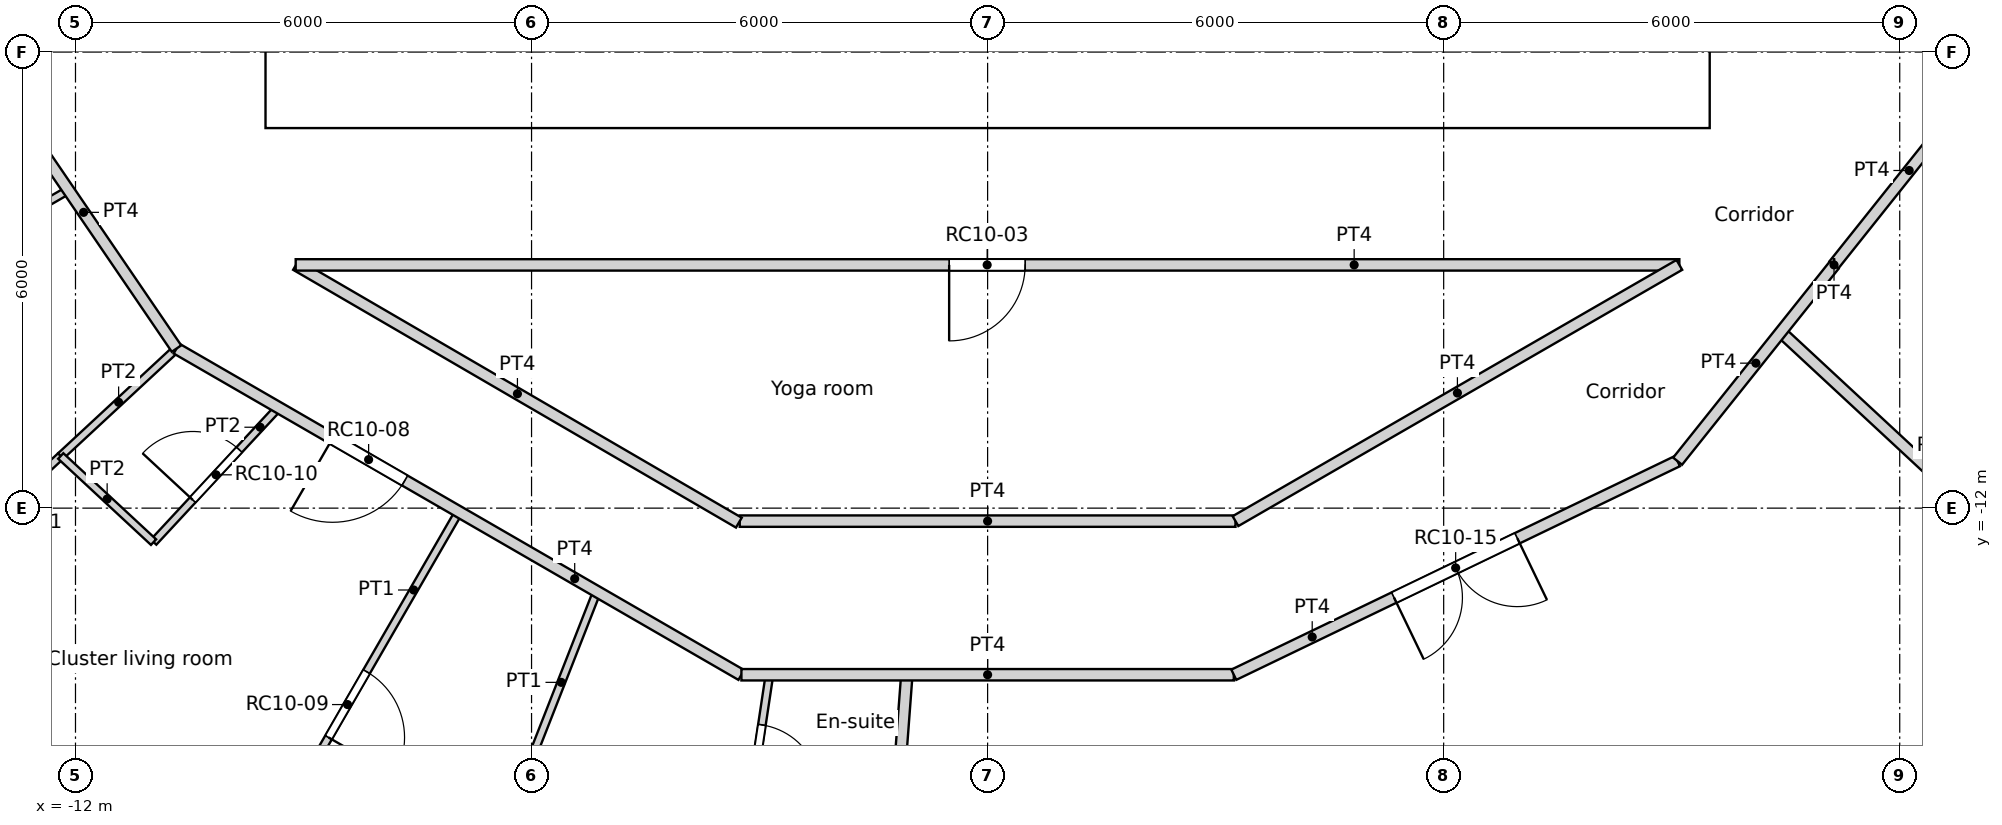
"""IFC4 building model, lengths in metres.
Left out: names, types, materials, properties, quantities, classifications, styles, units other than length and angle.
Written with IfcOpenShell. Run it as: python <this file> out.ifc"""

import sys

from ifc_helpers import new_model, si_unit, direction, frame, frame_2d, origin, origin_2d, place, context, subcontext, project, spatial, rectangle, circle, extrude, element, fill, save


model = new_model("IFC4")
c1 = context("Model", 3, precision=1e-05, world=origin(), true_north=direction((0.0, 1.0)))
c2 = subcontext(c1, "Body", "Model", "MODEL_VIEW")
j1 = project(units=[si_unit("LENGTHUNIT", "METRE"), si_unit("PLANEANGLEUNIT", "RADIAN")], contexts=[c1])
p1 = place(None, origin())
s1 = spatial("IfcSite", under=j1, at=p1, CompositionType="ELEMENT")
p2 = place(p1, origin())
s2 = spatial("IfcBuilding", under=s1, at=p2, CompositionType="ELEMENT")
p3 = place(p2, frame((0.0, 0.0, 323.4)))
s3 = spatial("IfcBuildingStorey", under=s2, at=p3, CompositionType="ELEMENT", Elevation=323.4)
p4 = place(p3, frame((11.735, -14.716, 0.0), z_axis=(0.0, 0.0, 1.0), x_axis=(1.0, 0.0, 0.0)))
e1 = element("IfcColumn", 1, at=p4, inside=s3, PredefinedType="COLUMN", context=c2, shape_type="SweptSolid", body=[
    extrude(circle(Radius=0.45, at=origin_2d()), origin(), (0.0, 0.0, 1.0), 3.6),
])
p5 = place(p3, frame((-9.5, -6.7, 0.0), z_axis=(0.0, 0.0, 1.0), x_axis=(1.0, 0.0, 0.0)))
e2 = element("IfcWall", 2, at=p5, inside=s3, PredefinedType="SOLIDWALL", context=c2, shape_type="SweptSolid", body=[
    extrude(rectangle(XDim=19.0, YDim=0.6, at=frame_2d((9.5, 0.0))), origin(), (0.0, 0.0, 1.0), 3.6),
])
p6 = place(p5, frame((10.4, 0.0, 0.0)))
e3 = element("IfcOpeningElement", 3, at=p6, cuts=e2, PredefinedType="OPENING", context=c2, shape_type="SweptSolid", body=[
    extrude(rectangle(XDim=1.0, YDim=2.1, at=frame_2d((0.5, 1.05))), frame((0.0, 0.3, 0.0), z_axis=(0.0, -1.0, 0.0), x_axis=(1.0, 0.0, 0.0)), (0.0, 0.0, 1.0), 0.6),
])
p7 = place(p5, frame((5.35, 0.0, 0.0)))
e4 = element("IfcOpeningElement", 4, at=p7, cuts=e2, PredefinedType="OPENING", context=c2, shape_type="SweptSolid", body=[
    extrude(rectangle(XDim=1.7, YDim=2.1, at=frame_2d((0.85, 1.05))), frame((0.0, 0.3, 0.0), z_axis=(0.0, -1.0, 0.0), x_axis=(1.0, 0.0, 0.0)), (0.0, 0.0, 1.0), 0.6),
])
p8 = place(p5, frame((11.95, 0.0, 0.0)))
e5 = element("IfcOpeningElement", 5, at=p8, cuts=e2, PredefinedType="OPENING", context=c2, shape_type="SweptSolid", body=[
    extrude(rectangle(XDim=1.7, YDim=2.1, at=frame_2d((0.85, 1.05))), frame((0.0, 0.3, 0.0), z_axis=(0.0, -1.0, 0.0), x_axis=(1.0, 0.0, 0.0)), (0.0, 0.0, 1.0), 0.6),
])
p9 = place(p3, frame((-9.2, -6.4, 0.0), z_axis=(0.0, 0.0, 1.0), x_axis=(0.0, 1.0, 0.0)))
e6 = element("IfcWall", 6, at=p9, inside=s3, PredefinedType="SOLIDWALL", context=c2, shape_type="SweptSolid", body=[
    extrude(rectangle(XDim=12.8, YDim=0.6, at=frame_2d((6.4, 0.0))), origin(), (0.0, 0.0, 1.0), 3.6),
])
p10 = place(p3, frame((9.2, -6.4, 0.0), z_axis=(0.0, 0.0, 1.0), x_axis=(0.0, 1.0, 0.0)))
e7 = element("IfcWall", 7, at=p10, inside=s3, PredefinedType="SOLIDWALL", context=c2, shape_type="SweptSolid", body=[
    extrude(rectangle(XDim=12.8, YDim=0.6, at=frame_2d((6.4, 0.0))), origin(), (0.0, 0.0, 1.0), 3.6),
])
p11 = place(p10, frame((6.4, 0.0, 0.0)))
e8 = element("IfcOpeningElement", 8, at=p11, cuts=e7, PredefinedType="OPENING", context=c2, shape_type="SweptSolid", body=[
    extrude(rectangle(XDim=1.8, YDim=2.1, at=frame_2d((0.9, 1.05))), frame((0.0, 0.3, 0.0), z_axis=(0.0, -1.0, 0.0), x_axis=(1.0, 0.0, 0.0)), (0.0, 0.0, 1.0), 0.6),
])
for number, where, z_axis, x_axis in (
    (9, (-2.25, -6.4, 0.0), (0.0, 0.0, 1.0), (0.0, 1.0, 0.0)),
    (10, (0.55, -6.4, 0.0), (0.0, 0.0, 1.0), (0.0, 1.0, 0.0)),
    (11, (2.25, -6.4, 0.0), (0.0, 0.0, 1.0), (0.0, 1.0, 0.0)),
):
    element("IfcWall", number, at=place(p3, frame(where, z_axis=z_axis, x_axis=x_axis)), inside=s3, PredefinedType="SOLIDWALL", context=c2, shape_type="SweptSolid", body=[
        extrude(rectangle(XDim=3.15, YDim=0.3, at=frame_2d((1.575, 0.0))), origin(), (0.0, 0.0, 1.0), 3.25),
    ])
p12 = place(p3, frame((-9.103, -8.8, 0.0), z_axis=(0.0, 0.0, 1.0), x_axis=(1.0, 0.0, 0.0)))
e12 = element("IfcWall", 12, at=p12, inside=s3, PredefinedType="PARTITIONING", context=c2, shape_type="SweptSolid", body=[
    extrude(rectangle(XDim=18.204, YDim=0.15, at=frame_2d((9.102, 0.0))), origin(), (0.0, 0.0, 1.0), 3.25),
])
p13 = place(p12, frame((8.597, 0.0, 0.0)))
e13 = element("IfcOpeningElement", 13, at=p13, cuts=e12, PredefinedType="OPENING", context=c2, shape_type="SweptSolid", body=[
    extrude(rectangle(XDim=1.0, YDim=2.04, at=frame_2d((0.5, 1.02))), frame((0.0, 0.075, 0.0), z_axis=(0.0, -1.0, 0.0), x_axis=(1.0, 0.0, 0.0)), (0.0, 0.0, 1.0), 0.15),
])
p14 = place(p3, frame((9.078, -11.382, 0.0), z_axis=(0.0, 0.0, 1.0), x_axis=(0.624018330412, 0.781409702595, 0.0)))
e14 = element("IfcWall", 14, at=p14, inside=s3, PredefinedType="PARTITIONING", context=c2, shape_type="SweptSolid", body=[
    extrude(rectangle(XDim=3.301, YDim=0.15, at=frame_2d((1.65, 0.0))), origin(), (0.0, 0.0, 1.0), 3.25),
])
p15 = place(p3, frame((11.137, -8.8, 0.0), z_axis=(0.0, 0.0, 1.0), x_axis=(-1.0, 0.0, 0.0)))
e15 = element("IfcWall", 15, at=p15, inside=s3, PredefinedType="PARTITIONING", context=c2, shape_type="SweptSolid", body=[
    extrude(rectangle(XDim=0.003, YDim=0.15, at=frame_2d((0.001, 0.0))), origin(), (0.0, 0.0, 1.0), 3.25),
])
p16 = place(p3, frame((11.134, -8.8, 0.0), z_axis=(0.0, 0.0, 1.0), x_axis=(0.623476099415, 0.781842409606, 0.0)))
e16 = element("IfcWall", 16, at=p16, inside=s3, PredefinedType="PARTITIONING", context=c2, shape_type="SweptSolid", body=[
    extrude(rectangle(XDim=3.177, YDim=0.15, at=frame_2d((1.589, 0.0))), origin(), (0.0, 0.0, 1.0), 3.25),
])
p17 = place(p3, frame((-9.099, -8.8, 0.0), z_axis=(0.0, 0.0, 1.0), x_axis=(0.864286794128, -0.502999341447, 0.0)))
e17 = element("IfcWall", 17, at=p17, inside=s3, PredefinedType="PARTITIONING", context=c2, shape_type="SweptSolid", body=[
    extrude(rectangle(XDim=6.741, YDim=0.15, at=frame_2d((3.371, 0.0))), origin(), (0.0, 0.0, 1.0), 3.25),
])
p18 = place(p3, frame((-10.671, -9.901, 0.0), z_axis=(0.0, 0.0, 1.0), x_axis=(0.865823993551, -0.500348690606, 0.0)))
e18 = element("IfcWall", 18, at=p18, inside=s3, PredefinedType="PARTITIONING", context=c2, shape_type="SweptSolid", body=[
    extrude(rectangle(XDim=8.582, YDim=0.15, at=frame_2d((4.291, 0.0))), origin(), (0.0, 0.0, 1.0), 3.25),
])
p19 = place(p18, frame((2.369, 0.0, 0.0)))
e19 = element("IfcOpeningElement", 19, at=p19, cuts=e18, PredefinedType="OPENING", context=c2, shape_type="SweptSolid", body=[
    extrude(rectangle(XDim=1.1, YDim=2.1, at=frame_2d((0.55, 1.05))), frame((0.0, 0.075, 0.0), z_axis=(0.0, -1.0, 0.0), x_axis=(1.0, 0.0, 0.0)), (0.0, 0.0, 1.0), 0.15),
])
p20 = place(p3, frame((-13.115, -6.316, 0.0), z_axis=(0.0, 0.0, 1.0), x_axis=(0.563434599286, -0.826160669802, 0.0)))
e20 = element("IfcWall", 20, at=p20, inside=s3, PredefinedType="PARTITIONING", context=c2, shape_type="SweptSolid", body=[
    extrude(rectangle(XDim=4.339, YDim=0.15, at=frame_2d((2.169, 0.0))), origin(), (0.0, 0.0, 1.0), 3.25),
])
p21 = place(p3, frame((-3.261, -12.171, 0.0), z_axis=(0.0, 0.0, 1.0), x_axis=(1.0, 0.0, 0.0)))
e21 = element("IfcWall", 21, at=p21, inside=s3, PredefinedType="PARTITIONING", context=c2, shape_type="SweptSolid", body=[
    extrude(rectangle(XDim=6.522, YDim=0.15, at=frame_2d((3.261, 0.0))), origin(), (0.0, 0.0, 1.0), 3.25),
])
p22 = place(p3, frame((3.261, -12.171, 0.0), z_axis=(0.0, 0.0, 1.0), x_axis=(0.866066809554, 0.499928276245, 0.0)))
e22 = element("IfcWall", 22, at=p22, inside=s3, PredefinedType="PARTITIONING", context=c2, shape_type="SweptSolid", body=[
    extrude(rectangle(XDim=6.743, YDim=0.15, at=frame_2d((3.371, 0.0))), origin(), (0.0, 0.0, 1.0), 3.25),
])
p23 = place(p3, frame((-3.239, -14.192, 0.0), z_axis=(0.0, 0.0, 1.0), x_axis=(1.0, 0.0, 0.0)))
e23 = element("IfcWall", 23, at=p23, inside=s3, PredefinedType="PARTITIONING", context=c2, shape_type="SweptSolid", body=[
    extrude(rectangle(XDim=6.478, YDim=0.15, at=frame_2d((3.239, 0.0))), origin(), (0.0, 0.0, 1.0), 3.25),
])
p24 = place(p3, frame((3.239, -14.192, 0.0), z_axis=(0.0, 0.0, 1.0), x_axis=(0.900976027191, 0.433868872388, 0.0)))
e24 = element("IfcWall", 24, at=p24, inside=s3, PredefinedType="PARTITIONING", context=c2, shape_type="SweptSolid", body=[
    extrude(rectangle(XDim=6.479, YDim=0.15, at=frame_2d((3.239, 0.0))), origin(), (0.0, 0.0, 1.0), 3.25),
])
p25 = place(p24, frame((2.34, 0.0, 0.0)))
e25 = element("IfcOpeningElement", 25, at=p25, cuts=e24, PredefinedType="OPENING", context=c2, shape_type="SweptSolid", body=[
    extrude(rectangle(XDim=1.8, YDim=2.1, at=frame_2d((0.9, 1.05))), frame((0.0, 0.075, 0.0), z_axis=(0.0, -1.0, 0.0), x_axis=(1.0, 0.0, 0.0)), (0.0, 0.0, 1.0), 0.15),
])
p26 = place(p3, frame((-9.886, -17.122, 0.0), z_axis=(0.0, 0.0, 1.0), x_axis=(0.500022903925, 0.866012179793, 0.0)))
e26 = element("IfcWall", 26, at=p26, inside=s3, PredefinedType="PARTITIONING", context=c2, shape_type="SweptSolid", body=[
    extrude(rectangle(XDim=5.862, YDim=0.1, at=frame_2d((2.931, 0.0))), origin(), (0.0, 0.0, 1.0), 3.25),
])
p27 = place(p26, frame((2.43, 0.0, 0.0)))
e27 = element("IfcOpeningElement", 27, at=p27, cuts=e26, PredefinedType="OPENING", context=c2, shape_type="SweptSolid", body=[
    extrude(rectangle(XDim=1.0, YDim=2.04, at=frame_2d((0.5, 1.02))), frame((0.0, 0.05, 0.0), z_axis=(0.0, -1.0, 0.0), x_axis=(1.0, 0.0, 0.0)), (0.0, 0.0, 1.0), 0.1),
])
p28 = place(p3, frame((-12.194, -11.314, 0.0), z_axis=(0.0, 0.0, 1.0), x_axis=(0.733064860014, -0.680158739569, 0.0)))
e28 = element("IfcWall", 28, at=p28, inside=s3, PredefinedType="PARTITIONING", context=c2, shape_type="SweptSolid", body=[
    extrude(rectangle(XDim=1.666, YDim=0.1, at=frame_2d((0.833, 0.0))), origin(), (0.0, 0.0, 1.0), 3.25),
])
p29 = place(p3, frame((-10.973, -12.447, 0.0), z_axis=(0.0, 0.0, 1.0), x_axis=(0.680296065293, 0.732937421303, 0.0)))
e29 = element("IfcWall", 29, at=p29, inside=s3, PredefinedType="PARTITIONING", context=c2, shape_type="SweptSolid", body=[
    extrude(rectangle(XDim=2.416, YDim=0.1, at=frame_2d((1.208, 0.0))), origin(), (0.0, 0.0, 1.0), 3.25),
])
p30 = place(p29, frame((0.758, 0.0, 0.0)))
e30 = element("IfcOpeningElement", 30, at=p30, cuts=e29, PredefinedType="OPENING", context=c2, shape_type="SweptSolid", body=[
    extrude(rectangle(XDim=0.9, YDim=2.0, at=frame_2d((0.45, 1.0))), frame((0.0, 0.05, 0.0), z_axis=(0.0, -1.0, 0.0), x_axis=(1.0, 0.0, 0.0)), (0.0, 0.0, 1.0), 0.1),
])
p31 = place(p3, frame((-14.493, -13.448, 0.0), z_axis=(0.0, 0.0, 1.0), x_axis=(0.732887738731, 0.680349588387, 0.0)))
e31 = element("IfcWall", 31, at=p31, inside=s3, PredefinedType="PARTITIONING", context=c2, shape_type="SweptSolid", body=[
    extrude(rectangle(XDim=3.137, YDim=0.1, at=frame_2d((1.568, 0.0))), origin(), (0.0, 0.0, 1.0), 3.25),
])
p32 = place(p31, frame((1.96, 0.0, 0.0)))
e32 = element("IfcOpeningElement", 32, at=p32, cuts=e31, PredefinedType="OPENING", context=c2, shape_type="SweptSolid", body=[
    extrude(rectangle(XDim=0.9, YDim=2.1, at=frame_2d((0.45, 1.05))), frame((0.0, 0.05, 0.0), z_axis=(0.0, -1.0, 0.0), x_axis=(1.0, 0.0, 0.0)), (0.0, 0.0, 1.0), 0.1),
])
p33 = place(p3, frame((-7.223, -18.405, 0.0), z_axis=(0.0, 0.0, 1.0), x_axis=(0.365331902423, 0.930877328691, 0.0)))
e33 = element("IfcWall", 33, at=p33, inside=s3, PredefinedType="PARTITIONING", context=c2, shape_type="SweptSolid", body=[
    extrude(rectangle(XDim=5.704, YDim=0.1, at=frame_2d((2.852, 0.0))), origin(), (0.0, 0.0, 1.0), 3.25),
])
p34 = place(p33, frame((2.182, 0.0, 0.0)))
e34 = element("IfcOpeningElement", 34, at=p34, cuts=e33, PredefinedType="OPENING", context=c2, shape_type="SweptSolid", body=[
    extrude(rectangle(XDim=0.9, YDim=2.1, at=frame_2d((0.45, 1.05))), frame((0.0, 0.05, 0.0), z_axis=(0.0, -1.0, 0.0), x_axis=(1.0, 0.0, 0.0)), (0.0, 0.0, 1.0), 0.1),
])
p35 = place(p3, frame((-12.194, -11.314, 0.0), z_axis=(0.0, 0.0, 1.0), x_axis=(0.733107294142, 0.680113001843, 0.0)))
e35 = element("IfcWall", 35, at=p35, inside=s3, PredefinedType="PARTITIONING", context=c2, shape_type="SweptSolid", body=[
    extrude(rectangle(XDim=2.078, YDim=0.1, at=frame_2d((1.039, 0.0))), origin(), (0.0, 0.0, 1.0), 3.25),
])
p36 = place(p3, frame((-14.242, -9.057, 0.0), z_axis=(0.0, 0.0, 1.0), x_axis=(0.865975856927, 0.500085807857, 0.0)))
e36 = element("IfcWall", 36, at=p36, inside=s3, PredefinedType="PARTITIONING", context=c2, shape_type="SweptSolid", body=[
    extrude(rectangle(XDim=2.481, YDim=0.1, at=frame_2d((1.241, 0.0))), origin(), (0.0, 0.0, 1.0), 3.25),
])
p37 = place(p36, frame((0.791, 0.0, 0.0)))
e37 = element("IfcOpeningElement", 37, at=p37, cuts=e36, PredefinedType="OPENING", context=c2, shape_type="SweptSolid", body=[
    extrude(rectangle(XDim=0.9, YDim=2.04, at=frame_2d((0.45, 1.02))), frame((0.0, 0.05, 0.0), z_axis=(0.0, -1.0, 0.0), x_axis=(1.0, 0.0, 0.0)), (0.0, 0.0, 1.0), 0.1),
])
p38 = place(p3, frame((-3.203, -16.401, 0.0), z_axis=(0.0, 0.0, 1.0), x_axis=(0.148960349288, 0.988843169739, 0.0)))
e38 = element("IfcWall", 38, at=p38, inside=s3, PredefinedType="PARTITIONING", context=c2, shape_type="SweptSolid", body=[
    extrude(rectangle(XDim=2.234, YDim=0.1, at=frame_2d((1.117, 0.0))), origin(), (0.0, 0.0, 1.0), 3.25),
])
p39 = place(p38, frame((0.667, 0.0, 0.0)))
e39 = element("IfcOpeningElement", 39, at=p39, cuts=e38, PredefinedType="OPENING", context=c2, shape_type="SweptSolid", body=[
    extrude(rectangle(XDim=0.9, YDim=2.04, at=frame_2d((0.45, 1.02))), frame((0.0, 0.05, 0.0), z_axis=(0.0, -1.0, 0.0), x_axis=(1.0, 0.0, 0.0)), (0.0, 0.0, 1.0), 0.1),
])
p40 = place(p3, frame((-1.478, -19.716, 0.0), z_axis=(0.0, 0.0, 1.0), x_axis=(0.074923617461, 0.997189275688, 0.0)))
e40 = element("IfcWall", 40, at=p40, inside=s3, PredefinedType="PARTITIONING", context=c2, shape_type="SweptSolid", body=[
    extrude(rectangle(XDim=5.54, YDim=0.15, at=frame_2d((2.77, 0.0))), origin(), (0.0, 0.0, 1.0), 3.25),
])
p41 = place(p3, frame((10.433, -9.68, 0.0), z_axis=(0.0, 0.0, 1.0), x_axis=(0.73295202722, -0.68028032883, 0.0)))
e41 = element("IfcWall", 41, at=p41, inside=s3, PredefinedType="PARTITIONING", context=c2, shape_type="SweptSolid", body=[
    extrude(rectangle(XDim=5.539, YDim=0.15, at=frame_2d((2.77, 0.0))), origin(), (0.0, 0.0, 1.0), 3.25),
])
p42 = place(p6, origin())
e42 = element("IfcDoor", 42, at=p42, inside=s3, OperationType="SINGLE_SWING_LEFT", PredefinedType="DOOR", context=c2, shape_type="SweptSolid", body=[
    extrude(rectangle(XDim=1.0, YDim=2.1, at=frame_2d((0.5, 1.05))), frame((0.0, 0.025, 0.0), z_axis=(0.0, -1.0, 0.0), x_axis=(1.0, 0.0, 0.0)), (0.0, 0.0, 1.0), 0.05),
])
fill(e3, e42)
p43 = place(p7, origin())
e43 = element("IfcDoor", 43, at=p43, inside=s3, OperationType="DOUBLE_DOOR_SINGLE_SWING", PredefinedType="DOOR", context=c2, shape_type="SweptSolid", body=[
    extrude(rectangle(XDim=1.7, YDim=2.1, at=frame_2d((0.85, 1.05))), frame((0.0, 0.025, 0.0), z_axis=(0.0, -1.0, 0.0), x_axis=(1.0, 0.0, 0.0)), (0.0, 0.0, 1.0), 0.05),
])
fill(e4, e43)
p44 = place(p8, origin())
e44 = element("IfcDoor", 44, at=p44, inside=s3, OperationType="DOUBLE_DOOR_SINGLE_SWING", PredefinedType="DOOR", context=c2, shape_type="SweptSolid", body=[
    extrude(rectangle(XDim=1.7, YDim=2.1, at=frame_2d((0.85, 1.05))), frame((0.0, 0.025, 0.0), z_axis=(0.0, -1.0, 0.0), x_axis=(1.0, 0.0, 0.0)), (0.0, 0.0, 1.0), 0.05),
])
fill(e5, e44)
p45 = place(p13, origin())
e45 = element("IfcDoor", 45, at=p45, inside=s3, OperationType="SINGLE_SWING_RIGHT", PredefinedType="DOOR", context=c2, shape_type="SweptSolid", body=[
    extrude(rectangle(XDim=1.0, YDim=2.04, at=frame_2d((0.5, 1.02))), frame((0.0, 0.025, 0.0), z_axis=(0.0, -1.0, 0.0), x_axis=(1.0, 0.0, 0.0)), (0.0, 0.0, 1.0), 0.05),
])
fill(e13, e45)
p46 = place(p19, origin())
e46 = element("IfcDoor", 46, at=p46, inside=s3, OperationType="SINGLE_SWING_RIGHT", PredefinedType="DOOR", context=c2, shape_type="SweptSolid", body=[
    extrude(rectangle(XDim=1.1, YDim=2.1, at=frame_2d((0.55, 1.05))), frame((0.0, 0.025, 0.0), z_axis=(0.0, -1.0, 0.0), x_axis=(1.0, 0.0, 0.0)), (0.0, 0.0, 1.0), 0.05),
])
fill(e19, e46)
p47 = place(p27, origin())
e47 = element("IfcDoor", 47, at=p47, inside=s3, OperationType="SINGLE_SWING_RIGHT", PredefinedType="DOOR", context=c2, shape_type="SweptSolid", body=[
    extrude(rectangle(XDim=1.0, YDim=2.04, at=frame_2d((0.5, 1.02))), frame((0.0, 0.025, 0.0), z_axis=(0.0, -1.0, 0.0), x_axis=(1.0, 0.0, 0.0)), (0.0, 0.0, 1.0), 0.05),
])
fill(e27, e47)
p48 = place(p30, origin())
e48 = element("IfcDoor", 48, at=p48, inside=s3, OperationType="SINGLE_SWING_LEFT", PredefinedType="DOOR", context=c2, shape_type="SweptSolid", body=[
    extrude(rectangle(XDim=0.9, YDim=2.0, at=frame_2d((0.45, 1.0))), frame((0.0, 0.025, 0.0), z_axis=(0.0, -1.0, 0.0), x_axis=(1.0, 0.0, 0.0)), (0.0, 0.0, 1.0), 0.05),
])
fill(e30, e48)
p49 = place(p39, origin())
e49 = element("IfcDoor", 49, at=p49, inside=s3, OperationType="SINGLE_SWING_RIGHT", PredefinedType="DOOR", context=c2, shape_type="SweptSolid", body=[
    extrude(rectangle(XDim=0.9, YDim=2.04, at=frame_2d((0.45, 1.02))), frame((0.0, 0.025, 0.0), z_axis=(0.0, -1.0, 0.0), x_axis=(1.0, 0.0, 0.0)), (0.0, 0.0, 1.0), 0.05),
])
fill(e39, e49)
p50 = place(p25, origin())
e50 = element("IfcDoor", 50, at=p50, inside=s3, OperationType="DOUBLE_DOOR_SINGLE_SWING", PredefinedType="DOOR", context=c2, shape_type="SweptSolid", body=[
    extrude(rectangle(XDim=1.8, YDim=2.1, at=frame_2d((0.9, 1.05))), frame((0.0, 0.025, 0.0), z_axis=(0.0, -1.0, 0.0), x_axis=(1.0, 0.0, 0.0)), (0.0, 0.0, 1.0), 0.05),
])
fill(e25, e50)
save(model, sys.argv[1])
